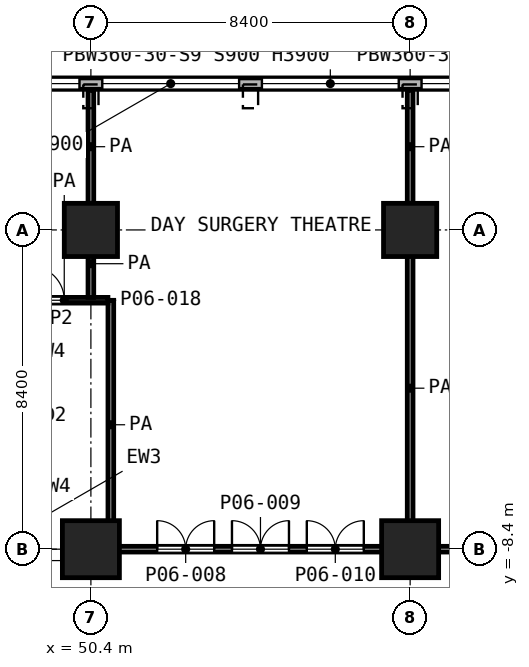
"""IFC4 building model, lengths in metres.
Left out: names, types, materials, properties, quantities, classifications, styles, units other than length and angle.
Written with IfcOpenShell. Run it as: python <this file> out.ifc"""

import sys

from ifc_helpers import new_model, si_unit, direction, frame, frame_2d, origin, origin_2d, place, context, subcontext, project, spatial, rectangle, extrude, element, fill, save


model = new_model("IFC4")
c1 = context("Model", 3, precision=1e-05, world=origin(), true_north=direction((0.0, 1.0)))
c2 = subcontext(c1, "Body", "Model", "MODEL_VIEW")
j1 = project(units=[si_unit("LENGTHUNIT", "METRE"), si_unit("PLANEANGLEUNIT", "RADIAN")], contexts=[c1])
p1 = place(None, origin())
s1 = spatial("IfcSite", under=j1, at=p1, CompositionType="ELEMENT")
p2 = place(p1, origin())
s2 = spatial("IfcBuilding", under=s1, at=p2, CompositionType="ELEMENT")
p3 = place(p2, frame((0.0, 0.0, 29.0)))
s3 = spatial("IfcBuildingStorey", under=s2, at=p3, CompositionType="ELEMENT", Elevation=29.0)
for number, where, z_axis, x_axis in (
    (1, (50.4, 0.0, 0.0), (0.0, 0.0, 1.0), (1.0, 0.0, 0.0)),
    (2, (58.8, 0.0, 0.0), (0.0, 0.0, 1.0), (1.0, 0.0, 0.0)),
):
    element("IfcColumn", number, at=place(p3, frame(where, z_axis=z_axis, x_axis=x_axis)), inside=s3, PredefinedType="COLUMN", context=c2, shape_type="SweptSolid", body=[
        extrude(rectangle(XDim=1.4, YDim=1.4, at=origin_2d()), origin(), (0.0, 0.0, 1.0), 5.2),
    ])
for number, where, z_axis, x_axis in (
    (3, (50.4, -8.4, 0.0), (0.0, 0.0, 1.0), (1.0, 0.0, 0.0)),
    (4, (58.8, -8.4, 0.0), (0.0, 0.0, 1.0), (1.0, 0.0, 0.0)),
):
    element("IfcColumn", number, at=place(p3, frame(where, z_axis=z_axis, x_axis=x_axis)), inside=s3, PredefinedType="COLUMN", context=c2, shape_type="SweptSolid", body=[
        extrude(rectangle(XDim=1.5, YDim=1.5, at=origin_2d()), origin(), (0.0, 0.0, 1.0), 5.2),
    ])
p4 = place(p3, frame((90.338, 3.85, 0.0), z_axis=(0.0, 0.0, 1.0), x_axis=(-1.0, 0.0, 0.0)))
e5 = element("IfcWall", 5, at=p4, inside=s3, PredefinedType="SOLIDWALL", context=c2, shape_type="SweptSolid", body=[
    extrude(rectangle(XDim=88.276, YDim=0.3, at=frame_2d((44.138, 0.0))), origin(), (0.0, 0.0, 1.0), 4.7),
])
p5 = place(p4, frame((0.438, 0.0, 0.9)))
e6 = element("IfcOpeningElement", 6, at=p5, cuts=e5, PredefinedType="OPENING", context=c2, shape_type="SweptSolid", body=[
    extrude(rectangle(XDim=1.2, YDim=3.0, at=frame_2d((0.6, 1.5))), frame((0.0, 0.16, 0.0), z_axis=(0.0, -1.0, 0.0), x_axis=(1.0, 0.0, 0.0)), (0.0, 0.0, 1.0), 0.32),
])
p6 = place(p4, frame((2.438, 0.0, 0.9)))
e7 = element("IfcOpeningElement", 7, at=p6, cuts=e5, PredefinedType="OPENING", context=c2, shape_type="SweptSolid", body=[
    extrude(rectangle(XDim=3.6, YDim=3.0, at=frame_2d((1.8, 1.5))), frame((0.0, 0.16, 0.0), z_axis=(0.0, -1.0, 0.0), x_axis=(1.0, 0.0, 0.0)), (0.0, 0.0, 1.0), 0.32),
])
p7 = place(p4, frame((6.638, 0.0, 0.9)))
e8 = element("IfcOpeningElement", 8, at=p7, cuts=e5, PredefinedType="OPENING", context=c2, shape_type="SweptSolid", body=[
    extrude(rectangle(XDim=3.6, YDim=3.0, at=frame_2d((1.8, 1.5))), frame((0.0, 0.16, 0.0), z_axis=(0.0, -1.0, 0.0), x_axis=(1.0, 0.0, 0.0)), (0.0, 0.0, 1.0), 0.32),
])
p8 = place(p4, frame((10.838, 0.0, 0.9)))
e9 = element("IfcOpeningElement", 9, at=p8, cuts=e5, PredefinedType="OPENING", context=c2, shape_type="SweptSolid", body=[
    extrude(rectangle(XDim=3.6, YDim=3.0, at=frame_2d((1.8, 1.5))), frame((0.0, 0.16, 0.0), z_axis=(0.0, -1.0, 0.0), x_axis=(1.0, 0.0, 0.0)), (0.0, 0.0, 1.0), 0.32),
])
p9 = place(p4, frame((15.038, 0.0, 0.9)))
e10 = element("IfcOpeningElement", 10, at=p9, cuts=e5, PredefinedType="OPENING", context=c2, shape_type="SweptSolid", body=[
    extrude(rectangle(XDim=3.6, YDim=3.0, at=frame_2d((1.8, 1.5))), frame((0.0, 0.16, 0.0), z_axis=(0.0, -1.0, 0.0), x_axis=(1.0, 0.0, 0.0)), (0.0, 0.0, 1.0), 0.32),
])
p10 = place(p4, frame((19.923, 0.0, 0.9)))
e11 = element("IfcOpeningElement", 11, at=p10, cuts=e5, PredefinedType="OPENING", context=c2, shape_type="SweptSolid", body=[
    extrude(rectangle(XDim=2.4, YDim=3.0, at=frame_2d((1.2, 1.5))), frame((0.0, 0.16, 0.0), z_axis=(0.0, -1.0, 0.0), x_axis=(1.0, 0.0, 0.0)), (0.0, 0.0, 1.0), 0.32),
])
p11 = place(p4, frame((23.438, 0.0, 0.9)))
e12 = element("IfcOpeningElement", 12, at=p11, cuts=e5, PredefinedType="OPENING", context=c2, shape_type="SweptSolid", body=[
    extrude(rectangle(XDim=3.6, YDim=3.0, at=frame_2d((1.8, 1.5))), frame((0.0, 0.16, 0.0), z_axis=(0.0, -1.0, 0.0), x_axis=(1.0, 0.0, 0.0)), (0.0, 0.0, 1.0), 0.32),
])
p12 = place(p4, frame((27.638, 0.0, 0.9)))
e13 = element("IfcOpeningElement", 13, at=p12, cuts=e5, PredefinedType="OPENING", context=c2, shape_type="SweptSolid", body=[
    extrude(rectangle(XDim=3.6, YDim=3.0, at=frame_2d((1.8, 1.5))), frame((0.0, 0.16, 0.0), z_axis=(0.0, -1.0, 0.0), x_axis=(1.0, 0.0, 0.0)), (0.0, 0.0, 1.0), 0.32),
])
p13 = place(p4, frame((31.838, 0.0, 0.9)))
e14 = element("IfcOpeningElement", 14, at=p13, cuts=e5, PredefinedType="OPENING", context=c2, shape_type="SweptSolid", body=[
    extrude(rectangle(XDim=3.6, YDim=3.0, at=frame_2d((1.8, 1.5))), frame((0.0, 0.16, 0.0), z_axis=(0.0, -1.0, 0.0), x_axis=(1.0, 0.0, 0.0)), (0.0, 0.0, 1.0), 0.32),
])
p14 = place(p4, frame((36.038, 0.0, 0.9)))
e15 = element("IfcOpeningElement", 15, at=p14, cuts=e5, PredefinedType="OPENING", context=c2, shape_type="SweptSolid", body=[
    extrude(rectangle(XDim=3.6, YDim=3.0, at=frame_2d((1.8, 1.5))), frame((0.0, 0.16, 0.0), z_axis=(0.0, -1.0, 0.0), x_axis=(1.0, 0.0, 0.0)), (0.0, 0.0, 1.0), 0.32),
])
p15 = place(p4, frame((40.238, 0.0, 0.9)))
e16 = element("IfcOpeningElement", 16, at=p15, cuts=e5, PredefinedType="OPENING", context=c2, shape_type="SweptSolid", body=[
    extrude(rectangle(XDim=3.6, YDim=3.0, at=frame_2d((1.8, 1.5))), frame((0.0, 0.16, 0.0), z_axis=(0.0, -1.0, 0.0), x_axis=(1.0, 0.0, 0.0)), (0.0, 0.0, 1.0), 0.32),
])
p16 = place(p4, frame((44.773, 0.0, 0.9)))
e17 = element("IfcOpeningElement", 17, at=p16, cuts=e5, PredefinedType="OPENING", context=c2, shape_type="SweptSolid", body=[
    extrude(rectangle(XDim=2.4, YDim=3.0, at=frame_2d((1.2, 1.5))), frame((0.0, 0.16, 0.0), z_axis=(0.0, -1.0, 0.0), x_axis=(1.0, 0.0, 0.0)), (0.0, 0.0, 1.0), 0.32),
])
p17 = place(p4, frame((49.173, 0.0, 0.9)))
e18 = element("IfcOpeningElement", 18, at=p17, cuts=e5, PredefinedType="OPENING", context=c2, shape_type="SweptSolid", body=[
    extrude(rectangle(XDim=2.4, YDim=3.0, at=frame_2d((1.2, 1.5))), frame((0.0, 0.16, 0.0), z_axis=(0.0, -1.0, 0.0), x_axis=(1.0, 0.0, 0.0)), (0.0, 0.0, 1.0), 0.32),
])
p18 = place(p4, frame((52.838, 0.0, 0.9)))
e19 = element("IfcOpeningElement", 19, at=p18, cuts=e5, PredefinedType="OPENING", context=c2, shape_type="SweptSolid", body=[
    extrude(rectangle(XDim=3.6, YDim=3.0, at=frame_2d((1.8, 1.5))), frame((0.0, 0.16, 0.0), z_axis=(0.0, -1.0, 0.0), x_axis=(1.0, 0.0, 0.0)), (0.0, 0.0, 1.0), 0.32),
])
p19 = place(p4, frame((57.038, 0.0, 0.9)))
e20 = element("IfcOpeningElement", 20, at=p19, cuts=e5, PredefinedType="OPENING", context=c2, shape_type="SweptSolid", body=[
    extrude(rectangle(XDim=3.6, YDim=3.0, at=frame_2d((1.8, 1.5))), frame((0.0, 0.16, 0.0), z_axis=(0.0, -1.0, 0.0), x_axis=(1.0, 0.0, 0.0)), (0.0, 0.0, 1.0), 0.32),
])
p20 = place(p4, frame((61.923, 0.0, 0.9)))
e21 = element("IfcOpeningElement", 21, at=p20, cuts=e5, PredefinedType="OPENING", context=c2, shape_type="SweptSolid", body=[
    extrude(rectangle(XDim=2.4, YDim=3.0, at=frame_2d((1.2, 1.5))), frame((0.0, 0.16, 0.0), z_axis=(0.0, -1.0, 0.0), x_axis=(1.0, 0.0, 0.0)), (0.0, 0.0, 1.0), 0.32),
])
p21 = place(p4, frame((65.438, 0.0, 0.9)))
e22 = element("IfcOpeningElement", 22, at=p21, cuts=e5, PredefinedType="OPENING", context=c2, shape_type="SweptSolid", body=[
    extrude(rectangle(XDim=3.6, YDim=3.0, at=frame_2d((1.8, 1.5))), frame((0.0, 0.16, 0.0), z_axis=(0.0, -1.0, 0.0), x_axis=(1.0, 0.0, 0.0)), (0.0, 0.0, 1.0), 0.32),
])
p22 = place(p4, frame((69.638, 0.0, 0.9)))
e23 = element("IfcOpeningElement", 23, at=p22, cuts=e5, PredefinedType="OPENING", context=c2, shape_type="SweptSolid", body=[
    extrude(rectangle(XDim=3.6, YDim=3.0, at=frame_2d((1.8, 1.5))), frame((0.0, 0.16, 0.0), z_axis=(0.0, -1.0, 0.0), x_axis=(1.0, 0.0, 0.0)), (0.0, 0.0, 1.0), 0.32),
])
p23 = place(p4, frame((73.838, 0.0, 0.9)))
e24 = element("IfcOpeningElement", 24, at=p23, cuts=e5, PredefinedType="OPENING", context=c2, shape_type="SweptSolid", body=[
    extrude(rectangle(XDim=3.6, YDim=3.0, at=frame_2d((1.8, 1.5))), frame((0.0, 0.16, 0.0), z_axis=(0.0, -1.0, 0.0), x_axis=(1.0, 0.0, 0.0)), (0.0, 0.0, 1.0), 0.32),
])
p24 = place(p4, frame((78.038, 0.0, 0.9)))
e25 = element("IfcOpeningElement", 25, at=p24, cuts=e5, PredefinedType="OPENING", context=c2, shape_type="SweptSolid", body=[
    extrude(rectangle(XDim=3.6, YDim=3.0, at=frame_2d((1.8, 1.5))), frame((0.0, 0.16, 0.0), z_axis=(0.0, -1.0, 0.0), x_axis=(1.0, 0.0, 0.0)), (0.0, 0.0, 1.0), 0.32),
])
p25 = place(p4, frame((82.238, 0.0, 0.9)))
e26 = element("IfcOpeningElement", 26, at=p25, cuts=e5, PredefinedType="OPENING", context=c2, shape_type="SweptSolid", body=[
    extrude(rectangle(XDim=3.6, YDim=3.0, at=frame_2d((1.8, 1.5))), frame((0.0, 0.16, 0.0), z_axis=(0.0, -1.0, 0.0), x_axis=(1.0, 0.0, 0.0)), (0.0, 0.0, 1.0), 0.32),
])
p26 = place(p4, frame((86.638, 0.0, 0.9)))
e27 = element("IfcOpeningElement", 27, at=p26, cuts=e5, PredefinedType="OPENING", context=c2, shape_type="SweptSolid", body=[
    extrude(rectangle(XDim=1.2, YDim=3.0, at=frame_2d((0.6, 1.5))), frame((0.0, 0.16, 0.0), z_axis=(0.0, -1.0, 0.0), x_axis=(1.0, 0.0, 0.0)), (0.0, 0.0, 1.0), 0.32),
])
p27 = place(p3, frame((51.0, -8.4, 0.0), z_axis=(0.0, 0.0, 1.0), x_axis=(1.0, 0.0, 0.0)))
e28 = element("IfcWall", 28, at=p27, inside=s3, PredefinedType="PARTITIONING", context=c2, shape_type="SweptSolid", body=[
    extrude(rectangle(XDim=26.2, YDim=0.15, at=frame_2d((13.1, 0.0))), origin(), (0.0, 0.0, 1.0), 4.7),
])
p28 = place(p27, frame((1.144, 0.0, 0.0)))
e29 = element("IfcOpeningElement", 29, at=p28, cuts=e28, PredefinedType="OPENING", context=c2, shape_type="SweptSolid", body=[
    extrude(rectangle(XDim=1.5, YDim=2.1, at=frame_2d((0.75, 1.05))), frame((0.0, 0.085, 0.0), z_axis=(0.0, -1.0, 0.0), x_axis=(1.0, 0.0, 0.0)), (0.0, 0.0, 1.0), 0.17),
])
p29 = place(p27, frame((3.112, 0.0, 0.0)))
e30 = element("IfcOpeningElement", 30, at=p29, cuts=e28, PredefinedType="OPENING", context=c2, shape_type="SweptSolid", body=[
    extrude(rectangle(XDim=1.5, YDim=2.1, at=frame_2d((0.75, 1.05))), frame((0.0, 0.085, 0.0), z_axis=(0.0, -1.0, 0.0), x_axis=(1.0, 0.0, 0.0)), (0.0, 0.0, 1.0), 0.17),
])
p30 = place(p27, frame((5.081, 0.0, 0.0)))
e31 = element("IfcOpeningElement", 31, at=p30, cuts=e28, PredefinedType="OPENING", context=c2, shape_type="SweptSolid", body=[
    extrude(rectangle(XDim=1.5, YDim=2.1, at=frame_2d((0.75, 1.05))), frame((0.0, 0.085, 0.0), z_axis=(0.0, -1.0, 0.0), x_axis=(1.0, 0.0, 0.0)), (0.0, 0.0, 1.0), 0.17),
])
p31 = place(p27, frame((9.15, 0.0, 0.0)))
e32 = element("IfcOpeningElement", 32, at=p31, cuts=e28, PredefinedType="OPENING", context=c2, shape_type="SweptSolid", body=[
    extrude(rectangle(XDim=1.5, YDim=2.1, at=frame_2d((0.75, 1.05))), frame((0.0, 0.085, 0.0), z_axis=(0.0, -1.0, 0.0), x_axis=(1.0, 0.0, 0.0)), (0.0, 0.0, 1.0), 0.17),
])
p32 = place(p27, frame((11.25, 0.0, 0.0)))
e33 = element("IfcOpeningElement", 33, at=p32, cuts=e28, PredefinedType="OPENING", context=c2, shape_type="SweptSolid", body=[
    extrude(rectangle(XDim=1.5, YDim=2.1, at=frame_2d((0.75, 1.05))), frame((0.0, 0.085, 0.0), z_axis=(0.0, -1.0, 0.0), x_axis=(1.0, 0.0, 0.0)), (0.0, 0.0, 1.0), 0.17),
])
p33 = place(p27, frame((13.35, 0.0, 0.0)))
e34 = element("IfcOpeningElement", 34, at=p33, cuts=e28, PredefinedType="OPENING", context=c2, shape_type="SweptSolid", body=[
    extrude(rectangle(XDim=1.5, YDim=2.1, at=frame_2d((0.75, 1.05))), frame((0.0, 0.085, 0.0), z_axis=(0.0, -1.0, 0.0), x_axis=(1.0, 0.0, 0.0)), (0.0, 0.0, 1.0), 0.17),
])
p34 = place(p27, frame((17.65, 0.0, 0.0)))
e35 = element("IfcOpeningElement", 35, at=p34, cuts=e28, PredefinedType="OPENING", context=c2, shape_type="SweptSolid", body=[
    extrude(rectangle(XDim=1.0, YDim=2.1, at=frame_2d((0.5, 1.05))), frame((0.0, 0.085, 0.0), z_axis=(0.0, -1.0, 0.0), x_axis=(1.0, 0.0, 0.0)), (0.0, 0.0, 1.0), 0.17),
])
p35 = place(p27, frame((20.875, 0.0, 0.0)))
e36 = element("IfcOpeningElement", 36, at=p35, cuts=e28, PredefinedType="OPENING", context=c2, shape_type="SweptSolid", body=[
    extrude(rectangle(XDim=1.5, YDim=2.1, at=frame_2d((0.75, 1.05))), frame((0.0, 0.085, 0.0), z_axis=(0.0, -1.0, 0.0), x_axis=(1.0, 0.0, 0.0)), (0.0, 0.0, 1.0), 0.17),
])
p36 = place(p27, frame((22.7, 0.0, 0.0)))
e37 = element("IfcOpeningElement", 37, at=p36, cuts=e28, PredefinedType="OPENING", context=c2, shape_type="SweptSolid", body=[
    extrude(rectangle(XDim=1.1, YDim=2.1, at=frame_2d((0.55, 1.05))), frame((0.0, 0.085, 0.0), z_axis=(0.0, -1.0, 0.0), x_axis=(1.0, 0.0, 0.0)), (0.0, 0.0, 1.0), 0.17),
])
p37 = place(p3, frame((48.55, -1.85, 0.0), z_axis=(0.0, 0.0, 1.0), x_axis=(1.0, 0.0, 0.0)))
e38 = element("IfcWall", 38, at=p37, inside=s3, PredefinedType="PARTITIONING", context=c2, shape_type="SweptSolid", body=[
    extrude(rectangle(XDim=2.298, YDim=0.15, at=frame_2d((1.149, 0.0))), origin(), (0.0, 0.0, 1.0), 4.7),
])
p38 = place(p37, frame((0.25, 0.0, 0.0)))
e39 = element("IfcOpeningElement", 39, at=p38, cuts=e38, PredefinedType="OPENING", context=c2, shape_type="SweptSolid", body=[
    extrude(rectangle(XDim=0.9, YDim=2.1, at=frame_2d((0.45, 1.05))), frame((0.0, 0.085, 0.0), z_axis=(0.0, -1.0, 0.0), x_axis=(1.0, 0.0, 0.0)), (0.0, 0.0, 1.0), 0.17),
])
p39 = place(p3, frame((50.4, -1.775, 0.0), z_axis=(0.0, 0.0, 1.0), x_axis=(0.0, 1.0, 0.0)))
e40 = element("IfcWall", 40, at=p39, inside=s3, PredefinedType="PARTITIONING", context=c2, shape_type="SweptSolid", body=[
    extrude(rectangle(XDim=1.773, YDim=0.15, at=frame_2d((0.886, 0.0))), origin(), (0.0, 0.0, 1.0), 4.7),
])
p40 = place(p3, frame((50.4, 0.7, 0.0), z_axis=(0.0, 0.0, 1.0), x_axis=(0.0, 1.0, 0.0)))
e41 = element("IfcWall", 41, at=p40, inside=s3, PredefinedType="PARTITIONING", context=c2, shape_type="SweptSolid", body=[
    extrude(rectangle(XDim=2.98, YDim=0.15, at=frame_2d((1.49, 0.0))), origin(), (0.0, 0.0, 1.0), 4.7),
])
p41 = place(p3, frame((50.925, -8.4, 0.0), z_axis=(0.0, 0.0, 1.0), x_axis=(0.0, 1.0, 0.0)))
e42 = element("IfcWall", 42, at=p41, inside=s3, PredefinedType="PARTITIONING", context=c2, shape_type="SweptSolid", body=[
    extrude(rectangle(XDim=6.548, YDim=0.15, at=frame_2d((3.274, 0.0))), origin(), (0.0, 0.0, 1.0), 4.7),
])
p42 = place(p3, frame((58.8, -8.325, 0.0), z_axis=(0.0, 0.0, 1.0), x_axis=(0.0, 1.0, 0.0)))
e43 = element("IfcWall", 43, at=p42, inside=s3, PredefinedType="PARTITIONING", context=c2, shape_type="SweptSolid", body=[
    extrude(rectangle(XDim=8.322, YDim=0.15, at=frame_2d((4.161, 0.0))), origin(), (0.0, 0.0, 1.0), 4.7),
])
p43 = place(p3, frame((58.8, 0.7, 0.0), z_axis=(0.0, 0.0, 1.0), x_axis=(0.0, 1.0, 0.0)))
e44 = element("IfcWall", 44, at=p43, inside=s3, PredefinedType="PARTITIONING", context=c2, shape_type="SweptSolid", body=[
    extrude(rectangle(XDim=2.98, YDim=0.15, at=frame_2d((1.49, 0.0))), origin(), (0.0, 0.0, 1.0), 4.7),
])
p44 = place(p12, origin())
e45 = element("IfcWindow", 45, at=p44, inside=s3, PartitioningType="SINGLE_PANEL", PredefinedType="WINDOW", context=c2, shape_type="SweptSolid", body=[
    extrude(rectangle(XDim=3.6, YDim=3.0, at=frame_2d((1.8, 1.5))), frame((0.0, 0.03, 0.0), z_axis=(0.0, -1.0, 0.0), x_axis=(1.0, 0.0, 0.0)), (0.0, 0.0, 1.0), 0.06),
])
fill(e13, e45)
p45 = place(p13, origin())
e46 = element("IfcWindow", 46, at=p45, inside=s3, PartitioningType="SINGLE_PANEL", PredefinedType="WINDOW", context=c2, shape_type="SweptSolid", body=[
    extrude(rectangle(XDim=3.6, YDim=3.0, at=frame_2d((1.8, 1.5))), frame((0.0, 0.03, 0.0), z_axis=(0.0, -1.0, 0.0), x_axis=(1.0, 0.0, 0.0)), (0.0, 0.0, 1.0), 0.06),
])
fill(e14, e46)
p46 = place(p14, origin())
e47 = element("IfcWindow", 47, at=p46, inside=s3, PartitioningType="SINGLE_PANEL", PredefinedType="WINDOW", context=c2, shape_type="SweptSolid", body=[
    extrude(rectangle(XDim=3.6, YDim=3.0, at=frame_2d((1.8, 1.5))), frame((0.0, 0.03, 0.0), z_axis=(0.0, -1.0, 0.0), x_axis=(1.0, 0.0, 0.0)), (0.0, 0.0, 1.0), 0.06),
])
fill(e15, e47)
p47 = place(p15, origin())
e48 = element("IfcWindow", 48, at=p47, inside=s3, PartitioningType="SINGLE_PANEL", PredefinedType="WINDOW", context=c2, shape_type="SweptSolid", body=[
    extrude(rectangle(XDim=3.6, YDim=3.0, at=frame_2d((1.8, 1.5))), frame((0.0, 0.03, 0.0), z_axis=(0.0, -1.0, 0.0), x_axis=(1.0, 0.0, 0.0)), (0.0, 0.0, 1.0), 0.06),
])
fill(e16, e48)
p48 = place(p38, origin())
e49 = element("IfcDoor", 49, at=p48, inside=s3, OperationType="SINGLE_SWING_LEFT", PredefinedType="DOOR", context=c2, shape_type="SweptSolid", body=[
    extrude(rectangle(XDim=0.9, YDim=2.1, at=frame_2d((0.45, 1.05))), frame((0.0, 0.025, 0.0), z_axis=(0.0, -1.0, 0.0), x_axis=(1.0, 0.0, 0.0)), (0.0, 0.0, 1.0), 0.05),
])
fill(e39, e49)
p49 = place(p28, origin())
e50 = element("IfcDoor", 50, at=p49, inside=s3, OperationType="DOUBLE_DOOR_SINGLE_SWING", PredefinedType="DOOR", context=c2, shape_type="SweptSolid", body=[
    extrude(rectangle(XDim=1.5, YDim=2.1, at=frame_2d((0.75, 1.05))), frame((0.0, 0.025, 0.0), z_axis=(0.0, -1.0, 0.0), x_axis=(1.0, 0.0, 0.0)), (0.0, 0.0, 1.0), 0.05),
])
fill(e29, e50)
p50 = place(p29, origin())
e51 = element("IfcDoor", 51, at=p50, inside=s3, OperationType="DOUBLE_DOOR_SINGLE_SWING", PredefinedType="DOOR", context=c2, shape_type="SweptSolid", body=[
    extrude(rectangle(XDim=1.5, YDim=2.1, at=frame_2d((0.75, 1.05))), frame((0.0, 0.025, 0.0), z_axis=(0.0, -1.0, 0.0), x_axis=(1.0, 0.0, 0.0)), (0.0, 0.0, 1.0), 0.05),
])
fill(e30, e51)
p51 = place(p30, origin())
e52 = element("IfcDoor", 52, at=p51, inside=s3, OperationType="DOUBLE_DOOR_SINGLE_SWING", PredefinedType="DOOR", context=c2, shape_type="SweptSolid", body=[
    extrude(rectangle(XDim=1.5, YDim=2.1, at=frame_2d((0.75, 1.05))), frame((0.0, 0.025, 0.0), z_axis=(0.0, -1.0, 0.0), x_axis=(1.0, 0.0, 0.0)), (0.0, 0.0, 1.0), 0.05),
])
fill(e31, e52)
save(model, sys.argv[1])
